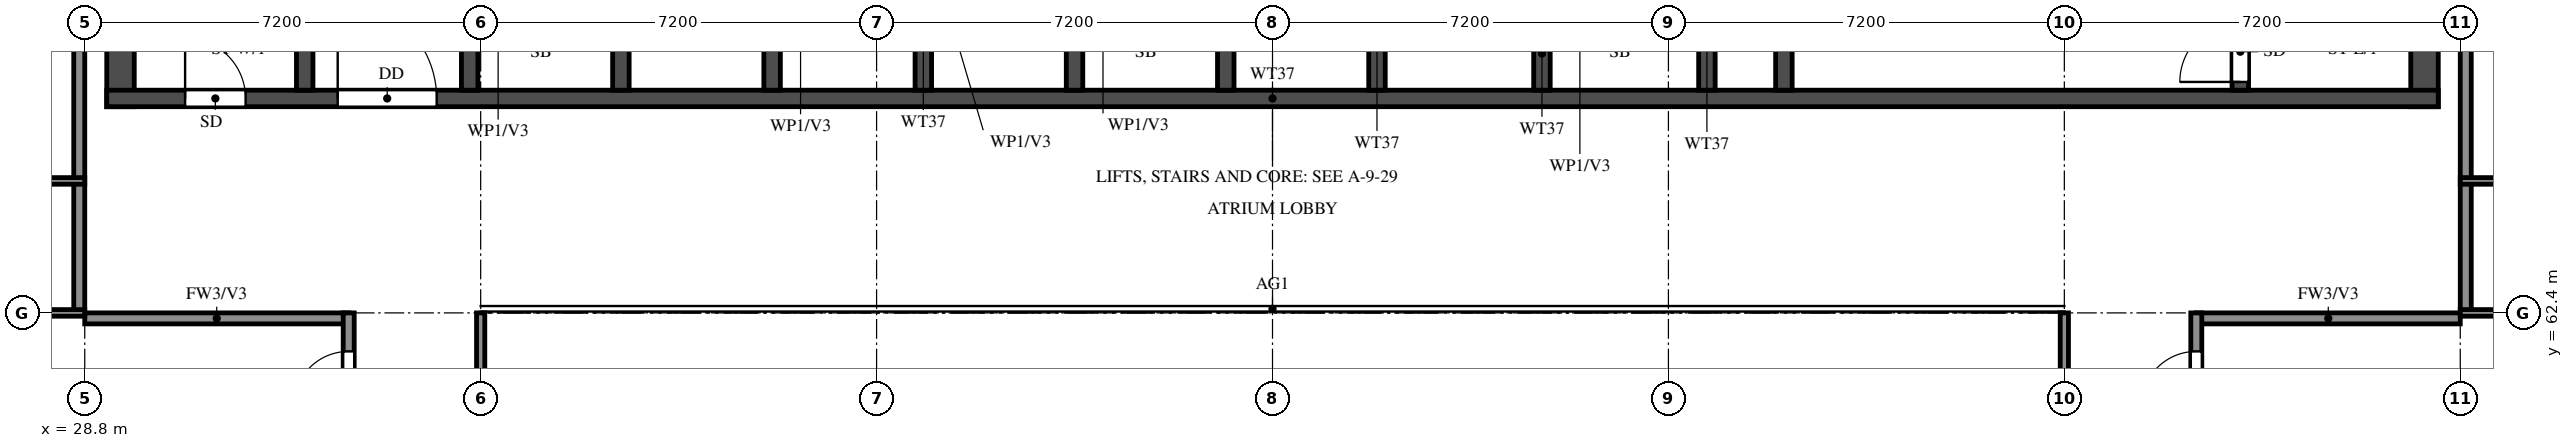
"""IFC4 building model, lengths in metres.
Left out: names, types, materials, properties, quantities, classifications, styles, units other than length and angle.
Written with IfcOpenShell. Run it as: python <this file> out.ifc"""

import sys

from ifc_helpers import new_model, si_unit, direction, frame, frame_2d, origin, place, context, subcontext, project, spatial, rectangle, extrude, element, fill, save


model = new_model("IFC4")
c1 = context("Model", 3, precision=1e-05, world=origin(), true_north=direction((0.0, 1.0)))
c2 = subcontext(c1, "Body", "Model", "MODEL_VIEW")
j1 = project(units=[si_unit("LENGTHUNIT", "METRE"), si_unit("PLANEANGLEUNIT", "RADIAN")], contexts=[c1])
p1 = place(None, origin())
s1 = spatial("IfcSite", under=j1, at=p1, CompositionType="ELEMENT")
p2 = place(p1, origin())
s2 = spatial("IfcBuilding", under=s1, at=p2, CompositionType="ELEMENT")
p3 = place(p2, frame((0.0, 0.0, 225.5)))
s3 = spatial("IfcBuildingStorey", under=s2, at=p3, CompositionType="ELEMENT", Elevation=225.5)
for number, where, z_axis, x_axis in (
    (1, (29.45, 66.15, 0.0), (0.0, 0.0, 1.0), (0.0, 1.0, 0.0)),
    (2, (71.35, 66.15, 0.0), (0.0, 0.0, 1.0), (0.0, 1.0, 0.0)),
):
    element("IfcWall", number, at=place(p3, frame(where, z_axis=z_axis, x_axis=x_axis)), inside=s3, PredefinedType="SHEAR", context=c2, shape_type="SweptSolid", body=[
        extrude(rectangle(XDim=11.85, YDim=0.5, at=frame_2d((5.925, 0.0))), origin(), (0.0, 0.0, 1.0), 3.22),
    ])
p4 = place(p3, frame((29.2, 66.3, 0.0), z_axis=(0.0, 0.0, 1.0), x_axis=(1.0, 0.0, 0.0)))
e3 = element("IfcWall", 3, at=p4, inside=s3, PredefinedType="SHEAR", context=c2, shape_type="SweptSolid", body=[
    extrude(rectangle(XDim=42.4, YDim=0.3, at=frame_2d((21.2, 0.0))), origin(), (0.0, 0.0, 1.0), 3.22),
])
p5 = place(p4, frame((1.425, 0.0, 0.0)))
e4 = element("IfcOpeningElement", 4, at=p5, cuts=e3, PredefinedType="OPENING", context=c2, shape_type="SweptSolid", body=[
    extrude(rectangle(XDim=1.1, YDim=2.1, at=frame_2d((0.55, 1.05))), frame((0.0, 0.16, 0.0), z_axis=(0.0, -1.0, 0.0), x_axis=(1.0, 0.0, 0.0)), (0.0, 0.0, 1.0), 0.32),
])
p6 = place(p4, frame((4.2, 0.0, 0.0)))
e5 = element("IfcOpeningElement", 5, at=p6, cuts=e3, PredefinedType="OPENING", context=c2, shape_type="SweptSolid", body=[
    extrude(rectangle(XDim=1.8, YDim=2.1, at=frame_2d((0.9, 1.05))), frame((0.0, 0.16, 0.0), z_axis=(0.0, -1.0, 0.0), x_axis=(1.0, 0.0, 0.0)), (0.0, 0.0, 1.0), 0.32),
])
p7 = place(p3, frame((32.8, 66.45, 0.0), z_axis=(0.0, 0.0, 1.0), x_axis=(0.0, 1.0, 0.0)))
e6 = element("IfcWall", 6, at=p7, inside=s3, PredefinedType="SHEAR", context=c2, shape_type="SweptSolid", body=[
    extrude(rectangle(XDim=11.05, YDim=0.3, at=frame_2d((5.525, 0.0))), origin(), (0.0, 0.0, 1.0), 3.22),
])
p8 = place(p3, frame((68.0, 66.45, 0.0), z_axis=(0.0, 0.0, 1.0), x_axis=(0.0, 1.0, 0.0)))
e7 = element("IfcWall", 7, at=p8, inside=s3, PredefinedType="SHEAR", context=c2, shape_type="SweptSolid", body=[
    extrude(rectangle(XDim=11.05, YDim=0.3, at=frame_2d((5.525, 0.0))), origin(), (0.0, 0.0, 1.0), 3.22),
])
p9 = place(p8, frame((0.15, 0.0, 0.0)))
e8 = element("IfcOpeningElement", 8, at=p9, cuts=e7, PredefinedType="OPENING", context=c2, shape_type="SweptSolid", body=[
    extrude(rectangle(XDim=1.1, YDim=2.1, at=frame_2d((0.55, 1.05))), frame((0.0, 0.16, 0.0), z_axis=(0.0, -1.0, 0.0), x_axis=(1.0, 0.0, 0.0)), (0.0, 0.0, 1.0), 0.32),
])
p10 = place(p3, frame((59.7, 66.45, 0.0), z_axis=(0.0, 0.0, 1.0), x_axis=(0.0, 1.0, 0.0)))
e9 = element("IfcWall", 9, at=p10, inside=s3, PredefinedType="SHEAR", context=c2, shape_type="SweptSolid", body=[
    extrude(rectangle(XDim=6.175, YDim=0.3, at=frame_2d((3.087, 0.0))), origin(), (0.0, 0.0, 1.0), 3.22),
])
p11 = place(p10, frame((3.85, 0.0, 0.0)))
e10 = element("IfcOpeningElement", 10, at=p11, cuts=e9, PredefinedType="OPENING", context=c2, shape_type="SweptSolid", body=[
    extrude(rectangle(XDim=1.2, YDim=2.1, at=frame_2d((0.6, 1.05))), frame((0.0, 0.16, 0.0), z_axis=(0.0, -1.0, 0.0), x_axis=(1.0, 0.0, 0.0)), (0.0, 0.0, 1.0), 0.32),
])
for number, where, z_axis, x_axis in (
    (11, (35.8, 66.45, 0.0), (0.0, 0.0, 1.0), (0.0, 1.0, 0.0)),
    (12, (38.55, 66.45, 0.0), (0.0, 0.0, 1.0), (0.0, 1.0, 0.0)),
    (13, (41.3, 66.45, 0.0), (0.0, 0.0, 1.0), (0.0, 1.0, 0.0)),
    (14, (44.05, 66.45, 0.0), (0.0, 0.0, 1.0), (0.0, 1.0, 0.0)),
    (15, (46.8, 66.45, 0.0), (0.0, 0.0, 1.0), (0.0, 1.0, 0.0)),
    (16, (49.55, 66.45, 0.0), (0.0, 0.0, 1.0), (0.0, 1.0, 0.0)),
    (17, (52.3, 66.45, 0.0), (0.0, 0.0, 1.0), (0.0, 1.0, 0.0)),
    (18, (55.3, 66.45, 0.0), (0.0, 0.0, 1.0), (0.0, 1.0, 0.0)),
    (19, (58.3, 66.45, 0.0), (0.0, 0.0, 1.0), (0.0, 1.0, 0.0)),
):
    element("IfcWall", number, at=place(p3, frame(where, z_axis=z_axis, x_axis=x_axis)), inside=s3, PredefinedType="SHEAR", context=c2, shape_type="SweptSolid", body=[
        extrude(rectangle(XDim=2.425, YDim=0.3, at=frame_2d((1.212, 0.0))), origin(), (0.0, 0.0, 1.0), 3.22),
    ])
for number, where, z_axis, x_axis in (
    (20, (28.8, 62.3, 0.0), (0.0, 0.0, 1.0), (1.0, 0.0, 0.0)),
    (21, (67.2, 62.3, 0.0), (0.0, 0.0, 1.0), (1.0, 0.0, 0.0)),
):
    element("IfcWall", number, at=place(p3, frame(where, z_axis=z_axis, x_axis=x_axis)), inside=s3, PredefinedType="SOLIDWALL", context=c2, shape_type="SweptSolid", body=[
        extrude(rectangle(XDim=4.8, YDim=0.2, at=frame_2d((2.4, 0.0))), origin(), (0.0, 0.0, 1.0), 3.22),
    ])
p12 = place(p3, frame((28.7, 62.4, 0.0), z_axis=(0.0, 0.0, 1.0), x_axis=(0.0, 1.0, 0.0)))
e22 = element("IfcWall", 22, at=p12, inside=s3, PredefinedType="SOLIDWALL", context=c2, shape_type="SweptSolid", body=[
    extrude(rectangle(XDim=15.6, YDim=0.2, at=frame_2d((7.8, 0.0))), origin(), (0.0, 0.0, 1.0), 3.22),
])
p13 = place(p3, frame((33.6, 60.0, 0.0), z_axis=(0.0, 0.0, 1.0), x_axis=(0.0, 1.0, 0.0)))
e23 = element("IfcWall", 23, at=p13, inside=s3, PredefinedType="SOLIDWALL", context=c2, shape_type="SweptSolid", body=[
    extrude(rectangle(XDim=2.4, YDim=0.2, at=frame_2d((1.2, 0.0))), origin(), (0.0, 0.0, 1.0), 3.22),
])
p14 = place(p13, frame((0.7, 0.0, 0.0)))
e24 = element("IfcOpeningElement", 24, at=p14, cuts=e23, PredefinedType="OPENING", context=c2, shape_type="SweptSolid", body=[
    extrude(rectangle(XDim=1.0, YDim=2.1, at=frame_2d((0.5, 1.05))), frame((0.0, 0.11, 0.0), z_axis=(0.0, -1.0, 0.0), x_axis=(1.0, 0.0, 0.0)), (0.0, 0.0, 1.0), 0.22),
])
p15 = place(p3, frame((67.2, 60.0, 0.0), z_axis=(0.0, 0.0, 1.0), x_axis=(0.0, 1.0, 0.0)))
e25 = element("IfcWall", 25, at=p15, inside=s3, PredefinedType="SOLIDWALL", context=c2, shape_type="SweptSolid", body=[
    extrude(rectangle(XDim=2.4, YDim=0.2, at=frame_2d((1.2, 0.0))), origin(), (0.0, 0.0, 1.0), 3.22),
])
p16 = place(p15, frame((0.7, 0.0, 0.0)))
e26 = element("IfcOpeningElement", 26, at=p16, cuts=e25, PredefinedType="OPENING", context=c2, shape_type="SweptSolid", body=[
    extrude(rectangle(XDim=1.0, YDim=2.1, at=frame_2d((0.5, 1.05))), frame((0.0, 0.11, 0.0), z_axis=(0.0, -1.0, 0.0), x_axis=(1.0, 0.0, 0.0)), (0.0, 0.0, 1.0), 0.22),
])
p17 = place(p3, frame((72.1, 62.4, 0.0), z_axis=(0.0, 0.0, 1.0), x_axis=(0.0, 1.0, 0.0)))
e27 = element("IfcWall", 27, at=p17, inside=s3, PredefinedType="SOLIDWALL", context=c2, shape_type="SweptSolid", body=[
    extrude(rectangle(XDim=15.6, YDim=0.2, at=frame_2d((7.8, 0.0))), origin(), (0.0, 0.0, 1.0), 3.22),
])
p18 = place(p3, frame((26.4, 62.4, 0.0), z_axis=(0.0, 0.0, 1.0), x_axis=(1.0, 0.0, 0.0)))
e28 = element("IfcWall", 28, at=p18, inside=s3, PredefinedType="PARTITIONING", context=c2, shape_type="SweptSolid", body=[
    extrude(rectangle(XDim=2.4, YDim=0.12, at=frame_2d((1.2, 0.0))), origin(), (0.0, 0.0, 1.0), 3.22),
])
p19 = place(p18, frame((0.75, 0.0, 0.0)))
e29 = element("IfcOpeningElement", 29, at=p19, cuts=e28, PredefinedType="OPENING", context=c2, shape_type="SweptSolid", body=[
    extrude(rectangle(XDim=0.9, YDim=2.1, at=frame_2d((0.45, 1.05))), frame((0.0, 0.07, 0.0), z_axis=(0.0, -1.0, 0.0), x_axis=(1.0, 0.0, 0.0)), (0.0, 0.0, 1.0), 0.14),
])
p20 = place(p3, frame((72.0, 62.4, 0.0), z_axis=(0.0, 0.0, 1.0), x_axis=(1.0, 0.0, 0.0)))
e30 = element("IfcWall", 30, at=p20, inside=s3, PredefinedType="PARTITIONING", context=c2, shape_type="SweptSolid", body=[
    extrude(rectangle(XDim=2.4, YDim=0.12, at=frame_2d((1.2, 0.0))), origin(), (0.0, 0.0, 1.0), 3.22),
])
p21 = place(p20, frame((0.75, 0.0, 0.0)))
e31 = element("IfcOpeningElement", 31, at=p21, cuts=e30, PredefinedType="OPENING", context=c2, shape_type="SweptSolid", body=[
    extrude(rectangle(XDim=0.9, YDim=2.1, at=frame_2d((0.45, 1.05))), frame((0.0, 0.07, 0.0), z_axis=(0.0, -1.0, 0.0), x_axis=(1.0, 0.0, 0.0)), (0.0, 0.0, 1.0), 0.14),
])
p22 = place(p3, frame((25.3, 64.8, 0.0), z_axis=(0.0, 0.0, 1.0), x_axis=(1.0, 0.0, 0.0)))
e32 = element("IfcWall", 32, at=p22, inside=s3, PredefinedType="PARTITIONING", context=c2, shape_type="SweptSolid", body=[
    extrude(rectangle(XDim=3.5, YDim=0.12, at=frame_2d((1.75, 0.0))), origin(), (0.0, 0.0, 1.0), 3.22),
])
p23 = place(p22, frame((1.35, 0.0, 0.0)))
e33 = element("IfcOpeningElement", 33, at=p23, cuts=e32, PredefinedType="OPENING", context=c2, shape_type="SweptSolid", body=[
    extrude(rectangle(XDim=0.8, YDim=2.1, at=frame_2d((0.4, 1.05))), frame((0.0, 0.07, 0.0), z_axis=(0.0, -1.0, 0.0), x_axis=(1.0, 0.0, 0.0)), (0.0, 0.0, 1.0), 0.14),
])
p24 = place(p3, frame((72.0, 64.8, 0.0), z_axis=(0.0, 0.0, 1.0), x_axis=(1.0, 0.0, 0.0)))
e34 = element("IfcWall", 34, at=p24, inside=s3, PredefinedType="PARTITIONING", context=c2, shape_type="SweptSolid", body=[
    extrude(rectangle(XDim=3.5, YDim=0.12, at=frame_2d((1.75, 0.0))), origin(), (0.0, 0.0, 1.0), 3.22),
])
for number, where, z_axis, x_axis in (
    (35, (36.0, 48.0, 0.0), (0.0, 0.0, 1.0), (0.0, 1.0, 0.0)),
    (36, (64.8, 48.0, 0.0), (0.0, 0.0, 1.0), (0.0, 1.0, 0.0)),
):
    element("IfcWall", number, at=place(p3, frame(where, z_axis=z_axis, x_axis=x_axis)), inside=s3, PredefinedType="SOLIDWALL", context=c2, shape_type="SweptSolid", body=[
        extrude(rectangle(XDim=14.4, YDim=0.15, at=frame_2d((7.2, 0.0))), origin(), (0.0, 0.0, 1.0), 2.32),
    ])
p25 = place(p5, origin())
e37 = element("IfcDoor", 37, at=p25, inside=s3, OperationType="SINGLE_SWING_LEFT", PredefinedType="DOOR", context=c2, shape_type="SweptSolid", body=[
    extrude(rectangle(XDim=1.1, YDim=2.1, at=frame_2d((0.55, 1.05))), frame((0.0, 0.025, 0.0), z_axis=(0.0, -1.0, 0.0), x_axis=(1.0, 0.0, 0.0)), (0.0, 0.0, 1.0), 0.05),
])
fill(e4, e37)
p26 = place(p9, origin())
e38 = element("IfcDoor", 38, at=p26, inside=s3, OperationType="SINGLE_SWING_RIGHT", PredefinedType="DOOR", context=c2, shape_type="SweptSolid", body=[
    extrude(rectangle(XDim=1.1, YDim=2.1, at=frame_2d((0.55, 1.05))), frame((0.0, 0.025, 0.0), z_axis=(0.0, -1.0, 0.0), x_axis=(1.0, 0.0, 0.0)), (0.0, 0.0, 1.0), 0.05),
])
fill(e8, e38)
p27 = place(p6, origin())
e39 = element("IfcDoor", 39, at=p27, inside=s3, OperationType="DOUBLE_DOOR_SINGLE_SWING", PredefinedType="DOOR", context=c2, shape_type="SweptSolid", body=[
    extrude(rectangle(XDim=1.8, YDim=2.1, at=frame_2d((0.9, 1.05))), frame((0.0, 0.025, 0.0), z_axis=(0.0, -1.0, 0.0), x_axis=(1.0, 0.0, 0.0)), (0.0, 0.0, 1.0), 0.05),
])
fill(e5, e39)
p28 = place(p14, origin())
e40 = element("IfcDoor", 40, at=p28, inside=s3, OperationType="SINGLE_SWING_RIGHT", PredefinedType="DOOR", context=c2, shape_type="SweptSolid", body=[
    extrude(rectangle(XDim=1.0, YDim=2.1, at=frame_2d((0.5, 1.05))), frame((0.0, 0.025, 0.0), z_axis=(0.0, -1.0, 0.0), x_axis=(1.0, 0.0, 0.0)), (0.0, 0.0, 1.0), 0.05),
])
fill(e24, e40)
p29 = place(p16, origin())
e41 = element("IfcDoor", 41, at=p29, inside=s3, OperationType="SINGLE_SWING_LEFT", PredefinedType="DOOR", context=c2, shape_type="SweptSolid", body=[
    extrude(rectangle(XDim=1.0, YDim=2.1, at=frame_2d((0.5, 1.05))), frame((0.0, 0.025, 0.0), z_axis=(0.0, -1.0, 0.0), x_axis=(1.0, 0.0, 0.0)), (0.0, 0.0, 1.0), 0.05),
])
fill(e26, e41)
save(model, sys.argv[1])
